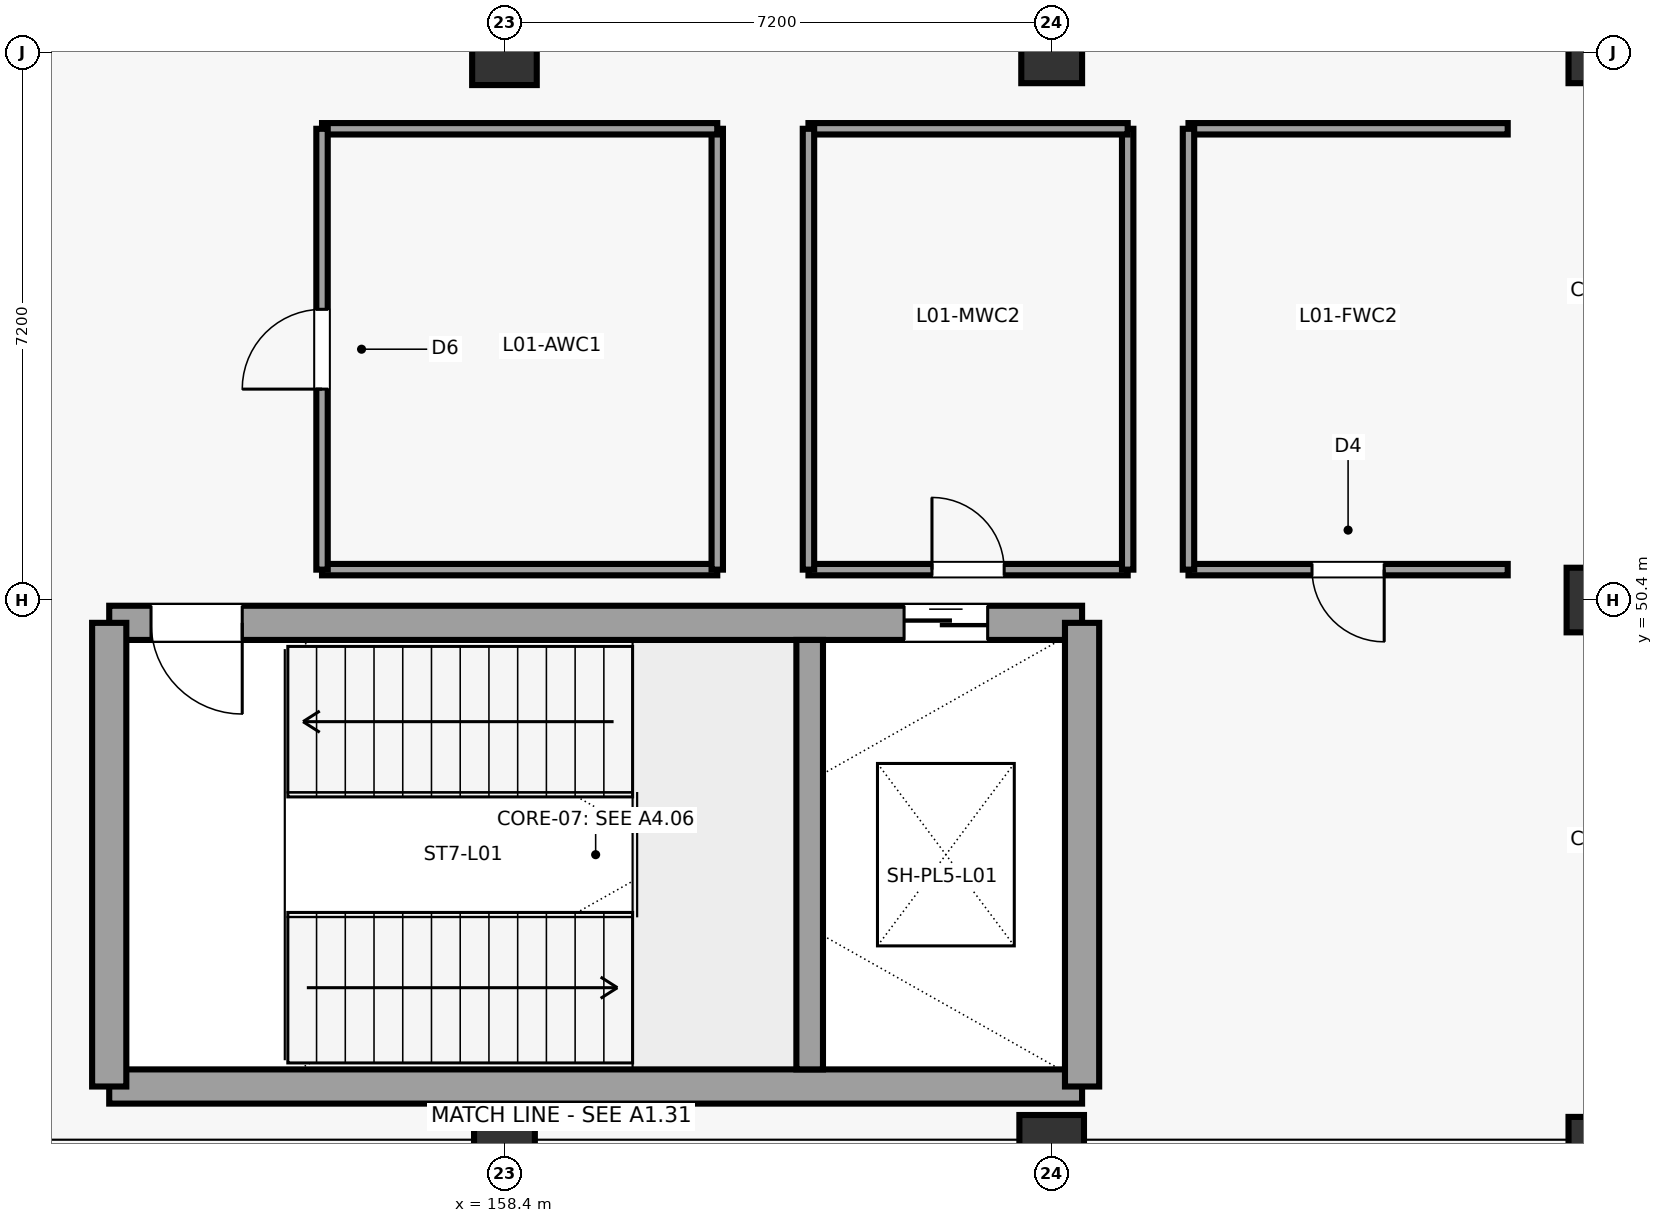
"""IFC4 building model, lengths in metres.
Left out: names, types, materials, properties, quantities, classifications, styles, units other than length and angle.
Written with IfcOpenShell. Run it as: python <this file> out.ifc"""

import sys

from ifc_helpers import new_model, si_unit, direction, frame, frame_2d, origin, origin_2d, place, context, subcontext, project, spatial, rectangle, circle, extrude, element, fill, save


model = new_model("IFC4")
c1 = context("Model", 3, precision=1e-05, world=origin(), true_north=direction((0.0, 1.0)))
c2 = subcontext(c1, "Body", "Model", "MODEL_VIEW")
j1 = project(units=[si_unit("LENGTHUNIT", "METRE"), si_unit("PLANEANGLEUNIT", "RADIAN")], contexts=[c1])
p1 = place(None, origin())
s1 = spatial("IfcSite", under=j1, at=p1, CompositionType="ELEMENT")
p2 = place(p1, origin())
s2 = spatial("IfcBuilding", under=s1, at=p2, CompositionType="ELEMENT")
p3 = place(p2, frame((0.0, 0.0, 5.4)))
s3 = spatial("IfcBuildingStorey", under=s2, at=p3, CompositionType="ELEMENT", Elevation=5.4)
p4 = place(p3, frame((158.4, 43.2, 0.0), z_axis=(0.0, 0.0, 1.0), x_axis=(1.0, 0.0, 0.0)))
e1 = element("IfcColumn", 1, at=p4, inside=s3, PredefinedType="COLUMN", context=c2, shape_type="SweptSolid", body=[
    extrude(circle(Radius=0.4, at=origin_2d()), origin(), (0.0, 0.0, 1.0), 4.2),
])
for number, where, z_axis, x_axis in (
    (2, (158.4, 57.6, 0.0), (0.0, 0.0, 1.0), (1.0, 0.0, 0.0)),
    (3, (165.6, 43.2, 0.0), (0.0, 0.0, 1.0), (1.0, 0.0, 0.0)),
):
    element("IfcColumn", number, at=place(p3, frame(where, z_axis=z_axis, x_axis=x_axis)), inside=s3, PredefinedType="COLUMN", context=c2, shape_type="SweptSolid", body=[
        extrude(rectangle(XDim=0.85, YDim=0.85, at=origin_2d()), origin(), (0.0, 0.0, 1.0), 4.2),
    ])
p5 = place(p3, frame((165.6, 57.6, 0.0), z_axis=(0.0, 0.0, 1.0), x_axis=(1.0, 0.0, 0.0)))
e4 = element("IfcColumn", 4, at=p5, inside=s3, PredefinedType="COLUMN", context=c2, shape_type="SweptSolid", body=[
    extrude(rectangle(XDim=0.8, YDim=0.8, at=origin_2d()), origin(), (0.0, 0.0, 1.0), 4.2),
])
p6 = place(p3, frame((172.8, 43.2, 0.0), z_axis=(0.0, 0.0, 1.0), x_axis=(1.0, 0.0, 0.0)))
e5 = element("IfcColumn", 5, at=p6, inside=s3, PredefinedType="COLUMN", context=c2, shape_type="SweptSolid", body=[
    extrude(circle(Radius=0.4, at=origin_2d()), origin(), (0.0, 0.0, 1.0), 4.2),
])
p7 = place(p3, frame((172.8, 50.4, 0.0), z_axis=(0.0, 0.0, 1.0), x_axis=(1.0, 0.0, 0.0)))
e6 = element("IfcColumn", 6, at=p7, inside=s3, PredefinedType="COLUMN", context=c2, shape_type="SweptSolid", body=[
    extrude(rectangle(XDim=0.85, YDim=0.85, at=origin_2d()), origin(), (0.0, 0.0, 1.0), 4.2),
])
p8 = place(p3, frame((172.8, 57.6, 0.0), z_axis=(0.0, 0.0, 1.0), x_axis=(1.0, 0.0, 0.0)))
e7 = element("IfcColumn", 7, at=p8, inside=s3, PredefinedType="COLUMN", context=c2, shape_type="SweptSolid", body=[
    extrude(rectangle(XDim=0.8, YDim=0.8, at=origin_2d()), origin(), (0.0, 0.0, 1.0), 4.2),
])
p9 = place(p3, frame((153.2, 44.0, 0.0), z_axis=(0.0, 0.0, 1.0), x_axis=(1.0, 0.0, 0.0)))
e8 = element("IfcWall", 8, at=p9, inside=s3, PredefinedType="SHEAR", context=c2, shape_type="SweptSolid", body=[
    extrude(rectangle(XDim=12.8, YDim=0.45, at=frame_2d((6.4, 0.0))), origin(), (0.0, 0.0, 1.0), 3.92),
])
p10 = place(p3, frame((153.2, 50.1, 0.0), z_axis=(0.0, 0.0, 1.0), x_axis=(1.0, 0.0, 0.0)))
e9 = element("IfcWall", 9, at=p10, inside=s3, PredefinedType="SHEAR", context=c2, shape_type="SweptSolid", body=[
    extrude(rectangle(XDim=12.8, YDim=0.45, at=frame_2d((6.4, 0.0))), origin(), (0.0, 0.0, 1.0), 3.92),
])
p11 = place(p10, frame((0.55, 0.0, 0.0)))
e10 = element("IfcOpeningElement", 10, at=p11, cuts=e9, PredefinedType="OPENING", context=c2, shape_type="SweptSolid", body=[
    extrude(rectangle(XDim=1.2, YDim=2.25, at=frame_2d((0.6, 1.125))), frame((0.0, 0.235, 0.0), z_axis=(0.0, -1.0, 0.0), x_axis=(1.0, 0.0, 0.0)), (0.0, 0.0, 1.0), 0.47),
])
p12 = place(p10, frame((10.458, 0.0, 0.0)))
e11 = element("IfcOpeningElement", 11, at=p12, cuts=e9, PredefinedType="OPENING", context=c2, shape_type="SweptSolid", body=[
    extrude(rectangle(XDim=1.1, YDim=2.2, at=frame_2d((0.55, 1.1))), frame((0.0, 0.235, 0.0), z_axis=(0.0, -1.0, 0.0), x_axis=(1.0, 0.0, 0.0)), (0.0, 0.0, 1.0), 0.47),
])
for number, where, z_axis, x_axis in (
    (12, (153.2, 44.0, 0.0), (0.0, 0.0, 1.0), (0.0, 1.0, 0.0)),
    (13, (166.0, 44.0, 0.0), (0.0, 0.0, 1.0), (0.0, 1.0, 0.0)),
):
    element("IfcWall", number, at=place(p3, frame(where, z_axis=z_axis, x_axis=x_axis)), inside=s3, PredefinedType="SHEAR", context=c2, shape_type="SweptSolid", body=[
        extrude(rectangle(XDim=6.1, YDim=0.45, at=frame_2d((3.05, 0.0))), origin(), (0.0, 0.0, 1.0), 3.92),
    ])
p13 = place(p3, frame((162.416, 44.225, 0.0), z_axis=(0.0, 0.0, 1.0), x_axis=(0.0, 1.0, 0.0)))
e14 = element("IfcWall", 14, at=p13, inside=s3, PredefinedType="SHEAR", context=c2, shape_type="SweptSolid", body=[
    extrude(rectangle(XDim=5.65, YDim=0.35, at=frame_2d((2.825, 0.0))), origin(), (0.0, 0.0, 1.0), 3.92),
])
p14 = place(p3, frame((156.0, 50.8, 0.0), z_axis=(0.0, 0.0, 1.0), x_axis=(1.0, 0.0, 0.0)))
e15 = element("IfcWall", 15, at=p14, inside=s3, PredefinedType="PARTITIONING", context=c2, shape_type="SweptSolid", body=[
    extrude(rectangle(XDim=5.2, YDim=0.15, at=frame_2d((2.6, 0.0))), origin(), (0.0, 0.0, 1.0), 2.98),
])
p15 = place(p3, frame((161.2, 50.8, 0.0), z_axis=(0.0, 0.0, 1.0), x_axis=(0.0, 1.0, 0.0)))
e16 = element("IfcWall", 16, at=p15, inside=s3, PredefinedType="PARTITIONING", context=c2, shape_type="SweptSolid", body=[
    extrude(rectangle(XDim=5.8, YDim=0.15, at=frame_2d((2.9, 0.0))), origin(), (0.0, 0.0, 1.0), 2.98),
])
p16 = place(p3, frame((161.2, 56.6, 0.0), z_axis=(0.0, 0.0, 1.0), x_axis=(-1.0, 0.0, 0.0)))
e17 = element("IfcWall", 17, at=p16, inside=s3, PredefinedType="PARTITIONING", context=c2, shape_type="SweptSolid", body=[
    extrude(rectangle(XDim=5.2, YDim=0.15, at=frame_2d((2.6, 0.0))), origin(), (0.0, 0.0, 1.0), 2.98),
])
p17 = place(p3, frame((156.0, 56.6, 0.0), z_axis=(0.0, 0.0, 1.0), x_axis=(0.0, -1.0, 0.0)))
e18 = element("IfcWall", 18, at=p17, inside=s3, PredefinedType="PARTITIONING", context=c2, shape_type="SweptSolid", body=[
    extrude(rectangle(XDim=5.8, YDim=0.15, at=frame_2d((2.9, 0.0))), origin(), (0.0, 0.0, 1.0), 2.98),
])
p18 = place(p17, frame((2.375, 0.0, 0.0)))
e19 = element("IfcOpeningElement", 19, at=p18, cuts=e18, PredefinedType="OPENING", context=c2, shape_type="SweptSolid", body=[
    extrude(rectangle(XDim=1.05, YDim=2.2, at=frame_2d((0.525, 1.1))), frame((0.0, 0.085, 0.0), z_axis=(0.0, -1.0, 0.0), x_axis=(1.0, 0.0, 0.0)), (0.0, 0.0, 1.0), 0.17),
])
p19 = place(p3, frame((162.4, 50.8, 0.0), z_axis=(0.0, 0.0, 1.0), x_axis=(1.0, 0.0, 0.0)))
e20 = element("IfcWall", 20, at=p19, inside=s3, PredefinedType="PARTITIONING", context=c2, shape_type="SweptSolid", body=[
    extrude(rectangle(XDim=4.2, YDim=0.15, at=frame_2d((2.1, 0.0))), origin(), (0.0, 0.0, 1.0), 2.98),
])
p20 = place(p19, frame((1.625, 0.0, 0.0)))
e21 = element("IfcOpeningElement", 21, at=p20, cuts=e20, PredefinedType="OPENING", context=c2, shape_type="SweptSolid", body=[
    extrude(rectangle(XDim=0.95, YDim=2.15, at=frame_2d((0.475, 1.075))), frame((0.0, 0.085, 0.0), z_axis=(0.0, -1.0, 0.0), x_axis=(1.0, 0.0, 0.0)), (0.0, 0.0, 1.0), 0.17),
])
p21 = place(p3, frame((166.6, 50.8, 0.0), z_axis=(0.0, 0.0, 1.0), x_axis=(0.0, 1.0, 0.0)))
e22 = element("IfcWall", 22, at=p21, inside=s3, PredefinedType="PARTITIONING", context=c2, shape_type="SweptSolid", body=[
    extrude(rectangle(XDim=5.8, YDim=0.15, at=frame_2d((2.9, 0.0))), origin(), (0.0, 0.0, 1.0), 2.98),
])
p22 = place(p3, frame((166.6, 56.6, 0.0), z_axis=(0.0, 0.0, 1.0), x_axis=(-1.0, 0.0, 0.0)))
e23 = element("IfcWall", 23, at=p22, inside=s3, PredefinedType="PARTITIONING", context=c2, shape_type="SweptSolid", body=[
    extrude(rectangle(XDim=4.2, YDim=0.15, at=frame_2d((2.1, 0.0))), origin(), (0.0, 0.0, 1.0), 2.98),
])
p23 = place(p3, frame((162.4, 56.6, 0.0), z_axis=(0.0, 0.0, 1.0), x_axis=(0.0, -1.0, 0.0)))
e24 = element("IfcWall", 24, at=p23, inside=s3, PredefinedType="PARTITIONING", context=c2, shape_type="SweptSolid", body=[
    extrude(rectangle(XDim=5.8, YDim=0.15, at=frame_2d((2.9, 0.0))), origin(), (0.0, 0.0, 1.0), 2.98),
])
p24 = place(p3, frame((167.4, 50.8, 0.0), z_axis=(0.0, 0.0, 1.0), x_axis=(1.0, 0.0, 0.0)))
e25 = element("IfcWall", 25, at=p24, inside=s3, PredefinedType="PARTITIONING", context=c2, shape_type="SweptSolid", body=[
    extrude(rectangle(XDim=4.2, YDim=0.15, at=frame_2d((2.1, 0.0))), origin(), (0.0, 0.0, 1.0), 2.98),
])
p25 = place(p24, frame((1.625, 0.0, 0.0)))
e26 = element("IfcOpeningElement", 26, at=p25, cuts=e25, PredefinedType="OPENING", context=c2, shape_type="SweptSolid", body=[
    extrude(rectangle(XDim=0.95, YDim=2.15, at=frame_2d((0.475, 1.075))), frame((0.0, 0.085, 0.0), z_axis=(0.0, -1.0, 0.0), x_axis=(1.0, 0.0, 0.0)), (0.0, 0.0, 1.0), 0.17),
])
p26 = place(p3, frame((171.6, 56.6, 0.0), z_axis=(0.0, 0.0, 1.0), x_axis=(-1.0, 0.0, 0.0)))
e27 = element("IfcWall", 27, at=p26, inside=s3, PredefinedType="PARTITIONING", context=c2, shape_type="SweptSolid", body=[
    extrude(rectangle(XDim=4.2, YDim=0.15, at=frame_2d((2.1, 0.0))), origin(), (0.0, 0.0, 1.0), 2.98),
])
p27 = place(p3, frame((167.4, 56.6, 0.0), z_axis=(0.0, 0.0, 1.0), x_axis=(0.0, -1.0, 0.0)))
e28 = element("IfcWall", 28, at=p27, inside=s3, PredefinedType="PARTITIONING", context=c2, shape_type="SweptSolid", body=[
    extrude(rectangle(XDim=5.8, YDim=0.15, at=frame_2d((2.9, 0.0))), origin(), (0.0, 0.0, 1.0), 2.98),
])
p28 = place(p11, frame((1.2, 0.0, 0.0), z_axis=(0.0, 0.0, 1.0), x_axis=(-1.0, 0.0, 0.0)))
e29 = element("IfcDoor", 29, at=p28, inside=s3, OperationType="SINGLE_SWING_RIGHT", PredefinedType="DOOR", context=c2, shape_type="SweptSolid", body=[
    extrude(rectangle(XDim=1.2, YDim=2.25, at=frame_2d((0.6, 1.125))), frame((0.0, 0.025, 0.0), z_axis=(0.0, -1.0, 0.0), x_axis=(1.0, 0.0, 0.0)), (0.0, 0.0, 1.0), 0.05),
])
fill(e10, e29)
p29 = place(p12, origin())
e30 = element("IfcDoor", 30, at=p29, inside=s3, OperationType="SLIDING_TO_LEFT", PredefinedType="DOOR", context=c2, shape_type="SweptSolid", body=[
    extrude(rectangle(XDim=1.1, YDim=2.2, at=frame_2d((0.55, 1.1))), frame((0.0, 0.025, 0.0), z_axis=(0.0, -1.0, 0.0), x_axis=(1.0, 0.0, 0.0)), (0.0, 0.0, 1.0), 0.05),
])
fill(e11, e30)
p30 = place(p18, frame((1.05, 0.0, 0.0), z_axis=(0.0, 0.0, 1.0), x_axis=(-1.0, 0.0, 0.0)))
e31 = element("IfcDoor", 31, at=p30, inside=s3, OperationType="SINGLE_SWING_RIGHT", PredefinedType="DOOR", context=c2, shape_type="SweptSolid", body=[
    extrude(rectangle(XDim=1.05, YDim=2.2, at=frame_2d((0.525, 1.1))), frame((0.0, 0.025, 0.0), z_axis=(0.0, -1.0, 0.0), x_axis=(1.0, 0.0, 0.0)), (0.0, 0.0, 1.0), 0.05),
])
fill(e19, e31)
p31 = place(p20, origin())
e32 = element("IfcDoor", 32, at=p31, inside=s3, OperationType="SINGLE_SWING_LEFT", PredefinedType="DOOR", context=c2, shape_type="SweptSolid", body=[
    extrude(rectangle(XDim=0.95, YDim=2.15, at=frame_2d((0.475, 1.075))), frame((0.0, 0.025, 0.0), z_axis=(0.0, -1.0, 0.0), x_axis=(1.0, 0.0, 0.0)), (0.0, 0.0, 1.0), 0.05),
])
fill(e21, e32)
p32 = place(p25, frame((0.95, 0.0, 0.0), z_axis=(0.0, 0.0, 1.0), x_axis=(-1.0, 0.0, 0.0)))
e33 = element("IfcDoor", 33, at=p32, inside=s3, OperationType="SINGLE_SWING_RIGHT", PredefinedType="DOOR", context=c2, shape_type="SweptSolid", body=[
    extrude(rectangle(XDim=0.95, YDim=2.15, at=frame_2d((0.475, 1.075))), frame((0.0, 0.025, 0.0), z_axis=(0.0, -1.0, 0.0), x_axis=(1.0, 0.0, 0.0)), (0.0, 0.0, 1.0), 0.05),
])
fill(e26, e33)
save(model, sys.argv[1])
